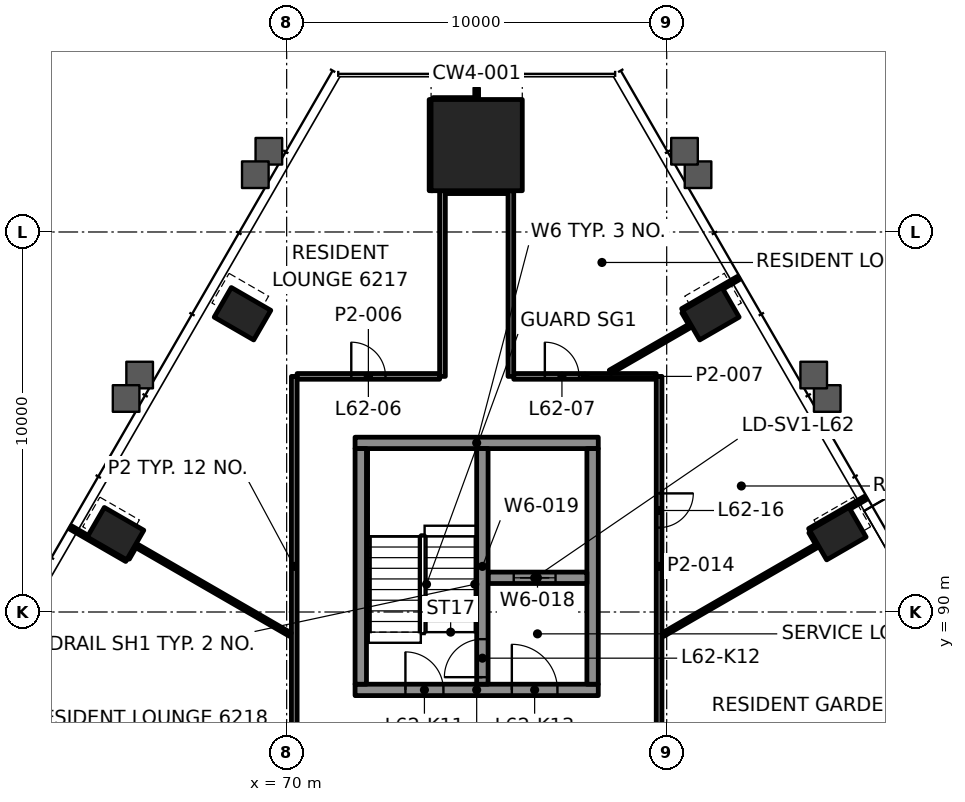
"""IFC4 building model, lengths in metres.
Left out: names, types, materials, properties, quantities, classifications, styles, units other than length and angle.
Written with IfcOpenShell. Run it as: python <this file> out.ifc"""

import sys

from ifc_helpers import new_model, si_unit, direction, frame, frame_2d, origin, origin_2d, place, context, subcontext, project, spatial, rectangle, hollow_rectangle, extrude, element, fill, save


model = new_model("IFC4")
c1 = context("Model", 3, precision=1e-05, world=origin(), true_north=direction((0.0, 1.0)))
c2 = subcontext(c1, "Body", "Model", "MODEL_VIEW")
j1 = project(units=[si_unit("LENGTHUNIT", "METRE"), si_unit("PLANEANGLEUNIT", "RADIAN")], contexts=[c1])
p1 = place(None, origin())
s1 = spatial("IfcSite", under=j1, at=p1, CompositionType="ELEMENT")
p2 = place(p1, origin())
s2 = spatial("IfcBuilding", under=s1, at=p2, CompositionType="ELEMENT")
p3 = place(p2, frame((0.0, 0.0, 263.6)))
s3 = spatial("IfcBuildingStorey", under=s2, at=p3, CompositionType="ELEMENT", Elevation=263.6)
p4 = place(p3, frame((75.0, 102.286, 0.0), z_axis=(0.0, 0.0, 1.0), x_axis=(-1.0, 0.0, 0.0)))
e1 = element("IfcColumn", 1, at=p4, inside=s3, PredefinedType="COLUMN", context=c2, shape_type="SweptSolid", body=[
    extrude(rectangle(XDim=2.4, YDim=2.4, at=origin_2d()), origin(), (0.0, 0.0, 1.0), 3.5),
])
for number, where, z_axis, x_axis in (
    (2, (84.503, 92.062, -0.0), (0.0, 0.0, 1.0), (-0.5, 0.866, 0.0)),
    (3, (81.162, 97.849, -0.0), (0.0, 0.0, 1.0), (-0.5, 0.866, 0.0)),
    (4, (68.838, 97.849, -0.0), (0.0, 0.0, 1.0), (-0.5, -0.866, 0.0)),
    (5, (65.497, 92.062, -0.0), (0.0, 0.0, 1.0), (-0.5, -0.866, 0.0)),
):
    element("IfcColumn", number, at=place(p3, frame(where, z_axis=z_axis, x_axis=x_axis)), inside=s3, PredefinedType="COLUMN", context=c2, shape_type="SweptSolid", body=[
        extrude(hollow_rectangle(XDim=0.9, YDim=1.2, WallThickness=0.06, at=origin_2d()), origin(), (0.0, 0.0, 1.0), 3.5),
    ])
p5 = place(p3, frame((71.8, 87.95, 0.0), z_axis=(0.0, 0.0, 1.0), x_axis=(1.0, 0.0, 0.0)))
e6 = element("IfcWall", 6, at=p5, inside=s3, PredefinedType="SHEAR", context=c2, shape_type="SweptSolid", body=[
    extrude(rectangle(XDim=6.4, YDim=0.3, at=frame_2d((3.2, 0.0))), origin(), (0.0, 0.0, 1.0), 3.3),
])
p6 = place(p5, frame((1.325, 0.0, 0.0)))
e7 = element("IfcOpeningElement", 7, at=p6, cuts=e6, PredefinedType="OPENING", context=c2, shape_type="SweptSolid", body=[
    extrude(rectangle(XDim=1.0, YDim=2.1, at=frame_2d((0.5, 1.05))), frame((0.0, 0.16, 0.0), z_axis=(0.0, -1.0, 0.0), x_axis=(1.0, 0.0, 0.0)), (0.0, 0.0, 1.0), 0.32),
])
p7 = place(p5, frame((4.125, 0.0, 0.0)))
e8 = element("IfcOpeningElement", 8, at=p7, cuts=e6, PredefinedType="OPENING", context=c2, shape_type="SweptSolid", body=[
    extrude(rectangle(XDim=1.2, YDim=2.1, at=frame_2d((0.6, 1.05))), frame((0.0, 0.16, 0.0), z_axis=(0.0, -1.0, 0.0), x_axis=(1.0, 0.0, 0.0)), (0.0, 0.0, 1.0), 0.32),
])
p8 = place(p3, frame((71.8, 94.45, 0.0), z_axis=(0.0, 0.0, 1.0), x_axis=(1.0, 0.0, 0.0)))
e9 = element("IfcWall", 9, at=p8, inside=s3, PredefinedType="SHEAR", context=c2, shape_type="SweptSolid", body=[
    extrude(rectangle(XDim=6.4, YDim=0.3, at=frame_2d((3.2, 0.0))), origin(), (0.0, 0.0, 1.0), 3.3),
])
for number, where, z_axis, x_axis in (
    (10, (71.95, 88.1, 0.0), (0.0, 0.0, 1.0), (0.0, 1.0, 0.0)),
    (11, (78.05, 88.1, 0.0), (0.0, 0.0, 1.0), (0.0, 1.0, 0.0)),
):
    element("IfcWall", number, at=place(p3, frame(where, z_axis=z_axis, x_axis=x_axis)), inside=s3, PredefinedType="SHEAR", context=c2, shape_type="SweptSolid", body=[
        extrude(rectangle(XDim=6.2, YDim=0.3, at=frame_2d((3.1, 0.0))), origin(), (0.0, 0.0, 1.0), 3.3),
    ])
p9 = place(p3, frame((75.3, 90.9, 0.0), z_axis=(0.0, 0.0, 1.0), x_axis=(1.0, 0.0, 0.0)))
e12 = element("IfcWall", 12, at=p9, inside=s3, PredefinedType="SHEAR", context=c2, shape_type="SweptSolid", body=[
    extrude(rectangle(XDim=2.6, YDim=0.3, at=frame_2d((1.3, 0.0))), origin(), (0.0, 0.0, 1.0), 3.3),
])
p10 = place(p9, frame((0.675, 0.0, 0.0)))
e13 = element("IfcOpeningElement", 13, at=p10, cuts=e12, PredefinedType="OPENING", context=c2, shape_type="SweptSolid", body=[
    extrude(rectangle(XDim=1.1, YDim=2.1, at=frame_2d((0.55, 1.05))), frame((0.0, 0.16, 0.0), z_axis=(0.0, -1.0, 0.0), x_axis=(1.0, 0.0, 0.0)), (0.0, 0.0, 1.0), 0.32),
])
p11 = place(p3, frame((75.15, 88.1, 0.0), z_axis=(0.0, 0.0, 1.0), x_axis=(0.0, 1.0, 0.0)))
e14 = element("IfcWall", 14, at=p11, inside=s3, PredefinedType="SHEAR", context=c2, shape_type="SweptSolid", body=[
    extrude(rectangle(XDim=6.2, YDim=0.3, at=frame_2d((3.1, 0.0))), origin(), (0.0, 0.0, 1.0), 3.3),
])
p12 = place(p11, frame((0.185, 0.0, 0.0)))
e15 = element("IfcOpeningElement", 15, at=p12, cuts=e14, PredefinedType="OPENING", context=c2, shape_type="SweptSolid", body=[
    extrude(rectangle(XDim=1.0, YDim=2.1, at=frame_2d((0.5, 1.05))), frame((0.0, 0.16, 0.0), z_axis=(0.0, -1.0, 0.0), x_axis=(1.0, 0.0, 0.0)), (0.0, 0.0, 1.0), 0.32),
])
p13 = place(p3, frame((70.275, 96.2, 0.0), z_axis=(0.0, 0.0, 1.0), x_axis=(1.0, 0.0, 0.0)))
e16 = element("IfcWall", 16, at=p13, inside=s3, PredefinedType="PARTITIONING", context=c2, shape_type="SweptSolid", body=[
    extrude(rectangle(XDim=3.75, YDim=0.15, at=frame_2d((1.875, 0.0))), origin(), (0.0, 0.0, 1.0), 2.7),
])
p14 = place(p13, frame((1.425, 0.0, 0.0)))
e17 = element("IfcOpeningElement", 17, at=p14, cuts=e16, PredefinedType="OPENING", context=c2, shape_type="SweptSolid", body=[
    extrude(rectangle(XDim=0.9, YDim=2.1, at=frame_2d((0.45, 1.05))), frame((0.0, 0.085, 0.0), z_axis=(0.0, -1.0, 0.0), x_axis=(1.0, 0.0, 0.0)), (0.0, 0.0, 1.0), 0.17),
])
p15 = place(p3, frame((75.975, 96.2, 0.0), z_axis=(0.0, 0.0, 1.0), x_axis=(1.0, 0.0, 0.0)))
e18 = element("IfcWall", 18, at=p15, inside=s3, PredefinedType="PARTITIONING", context=c2, shape_type="SweptSolid", body=[
    extrude(rectangle(XDim=3.75, YDim=0.15, at=frame_2d((1.875, 0.0))), origin(), (0.0, 0.0, 1.0), 2.7),
])
p16 = place(p15, frame((0.819, 0.0, 0.0)))
e19 = element("IfcOpeningElement", 19, at=p16, cuts=e18, PredefinedType="OPENING", context=c2, shape_type="SweptSolid", body=[
    extrude(rectangle(XDim=0.9, YDim=2.1, at=frame_2d((0.45, 1.05))), frame((0.0, 0.085, 0.0), z_axis=(0.0, -1.0, 0.0), x_axis=(1.0, 0.0, 0.0)), (0.0, 0.0, 1.0), 0.17),
])
p17 = place(p3, frame((74.18, 101.086, 0.0), z_axis=(0.0, 0.0, 1.0), x_axis=(1.0, 0.0, 0.0)))
e20 = element("IfcWall", 20, at=p17, inside=s3, PredefinedType="PARTITIONING", context=c2, shape_type="SweptSolid", body=[
    extrude(rectangle(XDim=1.644, YDim=0.15, at=frame_2d((0.822, 0.0))), origin(), (0.0, 0.0, 1.0), 2.697),
])
p18 = place(p3, frame((73.851, 103.486, 0.0), z_axis=(0.0, 0.0, 1.0), x_axis=(1.0, 0.0, 0.0)))
e21 = element("IfcWall", 21, at=p18, inside=s3, PredefinedType="PARTITIONING", context=c2, shape_type="SweptSolid", body=[
    extrude(rectangle(XDim=1.149, YDim=0.1, at=frame_2d((0.575, 0.0))), origin(), (0.0, 0.0, 1.0), 2.7),
])
p19 = place(p3, frame((79.901, 89.404, 0.0), z_axis=(0.0, 0.0, 1.0), x_axis=(0.866026044032, 0.499998891056, 0.0)))
e22 = element("IfcWall", 22, at=p19, inside=s3, PredefinedType="PARTITIONING", context=c2, shape_type="SweptSolid", body=[
    extrude(rectangle(XDim=4.714, YDim=0.1, at=frame_2d((2.357, 0.0))), origin(), (0.0, 0.0, 1.0), 2.7),
])
p20 = place(p3, frame((83.759, 92.151, 0.0), z_axis=(0.0, 0.0, 1.0), x_axis=(0.865979829179, 0.500078929226, 0.0)))
e23 = element("IfcWall", 23, at=p20, inside=s3, PredefinedType="PARTITIONING", context=c2, shape_type="SweptSolid", body=[
    extrude(rectangle(XDim=1.699, YDim=0.1, at=frame_2d((0.85, 0.0))), origin(), (0.0, 0.0, 1.0), 2.7),
])
p21 = place(p3, frame((78.514, 96.32, 0.0), z_axis=(0.0, 0.0, 1.0), x_axis=(0.866040013382, 0.499974694581, 0.0)))
e24 = element("IfcWall", 24, at=p21, inside=s3, PredefinedType="PARTITIONING", context=c2, shape_type="SweptSolid", body=[
    extrude(rectangle(XDim=2.458, YDim=0.1, at=frame_2d((1.229, 0.0))), origin(), (0.0, 0.0, 1.0), 2.7),
])
p22 = place(p3, frame((80.417, 97.939, 0.0), z_axis=(0.0, 0.0, 1.0), x_axis=(0.866077946534, 0.499908982242, 0.0)))
e25 = element("IfcWall", 25, at=p22, inside=s3, PredefinedType="PARTITIONING", context=c2, shape_type="SweptSolid", body=[
    extrude(rectangle(XDim=1.699, YDim=0.1, at=frame_2d((0.85, 0.0))), origin(), (0.0, 0.0, 1.0), 2.7),
])
p23 = place(p3, frame((65.817, 91.417, 0.0), z_axis=(0.0, 0.0, 1.0), x_axis=(0.499985493453, 0.866033778982, 0.0)))
e26 = element("IfcWall", 26, at=p23, inside=s3, PredefinedType="PARTITIONING", context=c2, shape_type="SweptSolid", body=[
    extrude(rectangle(XDim=0.348, YDim=0.1, at=frame_2d((0.174, 0.0))), origin(), (0.0, 0.0, 1.0), 2.7),
])
p24 = place(p3, frame((79.8, 96.199, 0.0), z_axis=(0.0, 0.0, 1.0), x_axis=(0.0, -1.0, 0.0)))
e27 = element("IfcWall", 27, at=p24, inside=s3, PredefinedType="PARTITIONING", context=c2, shape_type="SweptSolid", body=[
    extrude(rectangle(XDim=9.999, YDim=0.15, at=frame_2d((5.0, 0.0))), origin(), (0.0, 0.0, 1.0), 2.7),
])
p25 = place(p24, frame((3.078, 0.0, 0.0)))
e28 = element("IfcOpeningElement", 28, at=p25, cuts=e27, PredefinedType="OPENING", context=c2, shape_type="SweptSolid", body=[
    extrude(rectangle(XDim=0.9, YDim=2.1, at=frame_2d((0.45, 1.05))), frame((0.0, 0.085, 0.0), z_axis=(0.0, -1.0, 0.0), x_axis=(1.0, 0.0, 0.0)), (0.0, 0.0, 1.0), 0.17),
])
p26 = place(p3, frame((75.9, 96.2, 0.0), z_axis=(0.0, 0.0, 1.0), x_axis=(0.0, 1.0, 0.0)))
e29 = element("IfcWall", 29, at=p26, inside=s3, PredefinedType="PARTITIONING", context=c2, shape_type="SweptSolid", body=[
    extrude(rectangle(XDim=4.886, YDim=0.15, at=frame_2d((2.443, 0.0))), origin(), (0.0, 0.0, 1.0), 2.7),
])
p27 = place(p3, frame((75.0, 103.536, 0.0), z_axis=(0.0, 0.0, 1.0), x_axis=(0.0, 1.0, 0.0)))
e30 = element("IfcWall", 30, at=p27, inside=s3, PredefinedType="PARTITIONING", context=c2, shape_type="SweptSolid", body=[
    extrude(rectangle(XDim=0.25, YDim=0.1, at=frame_2d((0.125, 0.0))), origin(), (0.0, 0.0, 1.0), 2.7),
])
p28 = place(p3, frame((74.1, 96.2, 0.0), z_axis=(0.0, 0.0, 1.0), x_axis=(0.0, 1.0, 0.0)))
e31 = element("IfcWall", 31, at=p28, inside=s3, PredefinedType="PARTITIONING", context=c2, shape_type="SweptSolid", body=[
    extrude(rectangle(XDim=4.886, YDim=0.15, at=frame_2d((2.443, 0.0))), origin(), (0.0, 0.0, 1.0), 2.7),
])
p29 = place(p3, frame((73.8, 101.087, 0.0), z_axis=(0.0, 0.0, 1.0), x_axis=(0.0, 1.0, 0.0)))
e32 = element("IfcWall", 32, at=p29, inside=s3, PredefinedType="PARTITIONING", context=c2, shape_type="SweptSolid", body=[
    extrude(rectangle(XDim=2.399, YDim=0.1, at=frame_2d((1.199, 0.0))), origin(), (0.0, 0.0, 1.0), 2.7),
])
p30 = place(p3, frame((70.2, 86.202, 0.0), z_axis=(0.0, 0.0, 1.0), x_axis=(0.0, 1.0, 0.0)))
e33 = element("IfcWall", 33, at=p30, inside=s3, PredefinedType="PARTITIONING", context=c2, shape_type="SweptSolid", body=[
    extrude(rectangle(XDim=9.998, YDim=0.15, at=frame_2d((4.999, 0.0))), origin(), (0.0, 0.0, 1.0), 2.7),
])
for number, where, z_axis, x_axis in (
    (34, (83.954, 91.813, 0.0), (0.0, 0.0, 1.0), (-0.5, 0.866, 0.0)),
    (35, (80.613, 97.601, 0.0), (0.0, 0.0, 1.0), (-0.5, 0.866, 0.0)),
):
    element("IfcWall", number, at=place(p3, frame(where, z_axis=z_axis, x_axis=x_axis)), inside=s3, PredefinedType="PARTITIONING", context=c2, shape_type="SweptSolid", body=[
        extrude(rectangle(XDim=0.34, YDim=0.1, at=frame_2d((0.17, 0.0))), origin(), (0.0, 0.0, 1.0), 2.7),
    ])
p31 = place(p3, frame((70.099, 89.404, 0.0), z_axis=(0.0, 0.0, 1.0), x_axis=(-0.866026044032, 0.499998891056, 0.0)))
e36 = element("IfcWall", 36, at=p31, inside=s3, PredefinedType="PARTITIONING", context=c2, shape_type="SweptSolid", body=[
    extrude(rectangle(XDim=4.714, YDim=0.1, at=frame_2d((2.357, 0.0))), origin(), (0.0, 0.0, 1.0), 2.7),
])
p32 = place(p3, frame((65.79, 91.373, 0.0), z_axis=(0.0, 0.0, 1.0), x_axis=(-0.866085039529, 0.499896693632, 0.0)))
e37 = element("IfcWall", 37, at=p32, inside=s3, PredefinedType="PARTITIONING", context=c2, shape_type="SweptSolid", body=[
    extrude(rectangle(XDim=1.698, YDim=0.1, at=frame_2d((0.849, 0.0))), origin(), (0.0, 0.0, 1.0), 2.688),
])
p33 = place(p14, origin())
e38 = element("IfcDoor", 38, at=p33, inside=s3, OperationType="SINGLE_SWING_RIGHT", PredefinedType="DOOR", context=c2, shape_type="SweptSolid", body=[
    extrude(rectangle(XDim=0.9, YDim=2.1, at=frame_2d((0.45, 1.05))), frame((0.0, 0.025, 0.0), z_axis=(0.0, -1.0, 0.0), x_axis=(1.0, 0.0, 0.0)), (0.0, 0.0, 1.0), 0.05),
])
fill(e17, e38)
p34 = place(p16, origin())
e39 = element("IfcDoor", 39, at=p34, inside=s3, OperationType="SINGLE_SWING_LEFT", PredefinedType="DOOR", context=c2, shape_type="SweptSolid", body=[
    extrude(rectangle(XDim=0.9, YDim=2.1, at=frame_2d((0.45, 1.05))), frame((0.0, 0.025, 0.0), z_axis=(0.0, -1.0, 0.0), x_axis=(1.0, 0.0, 0.0)), (0.0, 0.0, 1.0), 0.05),
])
fill(e19, e39)
p35 = place(p25, origin())
e40 = element("IfcDoor", 40, at=p35, inside=s3, OperationType="SINGLE_SWING_LEFT", PredefinedType="DOOR", context=c2, shape_type="SweptSolid", body=[
    extrude(rectangle(XDim=0.9, YDim=2.1, at=frame_2d((0.45, 1.05))), frame((0.0, 0.025, 0.0), z_axis=(0.0, -1.0, 0.0), x_axis=(1.0, 0.0, 0.0)), (0.0, 0.0, 1.0), 0.05),
])
fill(e28, e40)
p36 = place(p10, origin())
e41 = element("IfcDoor", 41, at=p36, inside=s3, OperationType="DOUBLE_DOOR_SLIDING", PredefinedType="DOOR", context=c2, shape_type="SweptSolid", body=[
    extrude(rectangle(XDim=1.1, YDim=2.1, at=frame_2d((0.55, 1.05))), frame((0.0, 0.025, 0.0), z_axis=(0.0, -1.0, 0.0), x_axis=(1.0, 0.0, 0.0)), (0.0, 0.0, 1.0), 0.05),
])
fill(e13, e41)
p37 = place(p6, origin())
e42 = element("IfcDoor", 42, at=p37, inside=s3, OperationType="SINGLE_SWING_RIGHT", PredefinedType="DOOR", context=c2, shape_type="SweptSolid", body=[
    extrude(rectangle(XDim=1.0, YDim=2.1, at=frame_2d((0.5, 1.05))), frame((0.0, 0.025, 0.0), z_axis=(0.0, -1.0, 0.0), x_axis=(1.0, 0.0, 0.0)), (0.0, 0.0, 1.0), 0.05),
])
fill(e7, e42)
p38 = place(p12, origin())
e43 = element("IfcDoor", 43, at=p38, inside=s3, OperationType="SINGLE_SWING_LEFT", PredefinedType="DOOR", context=c2, shape_type="SweptSolid", body=[
    extrude(rectangle(XDim=1.0, YDim=2.1, at=frame_2d((0.5, 1.05))), frame((0.0, 0.025, 0.0), z_axis=(0.0, -1.0, 0.0), x_axis=(1.0, 0.0, 0.0)), (0.0, 0.0, 1.0), 0.05),
])
fill(e15, e43)
p39 = place(p7, origin())
e44 = element("IfcDoor", 44, at=p39, inside=s3, OperationType="SINGLE_SWING_RIGHT", PredefinedType="DOOR", context=c2, shape_type="SweptSolid", body=[
    extrude(rectangle(XDim=1.2, YDim=2.1, at=frame_2d((0.6, 1.05))), frame((0.0, 0.025, 0.0), z_axis=(0.0, -1.0, 0.0), x_axis=(1.0, 0.0, 0.0)), (0.0, 0.0, 1.0), 0.05),
])
fill(e8, e44)
save(model, sys.argv[1])
